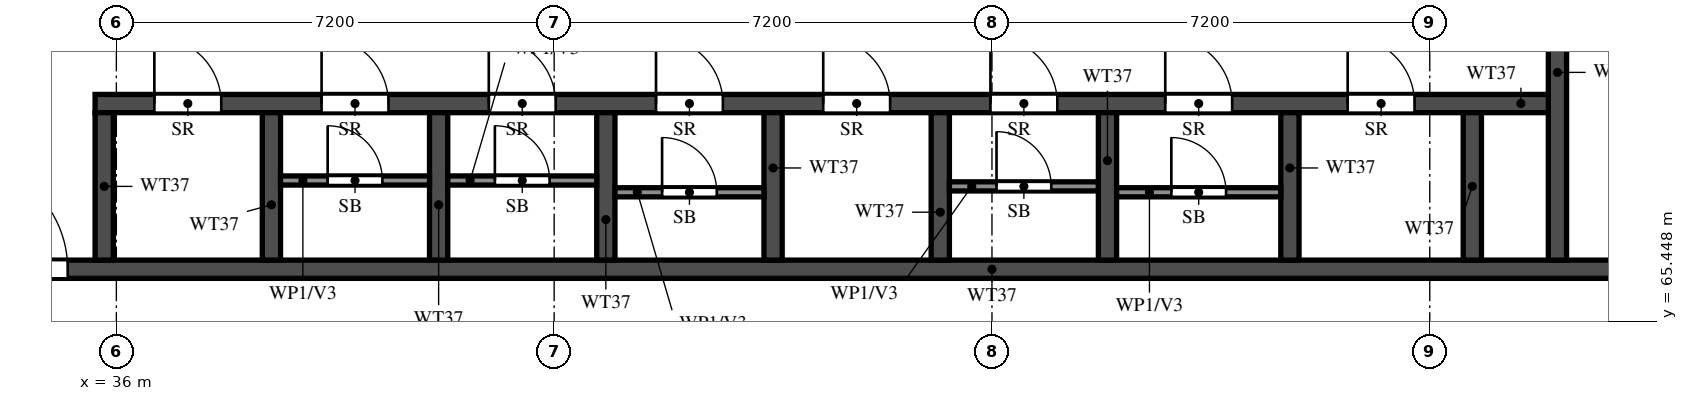
"""IFC4 building model, lengths in metres.
Left out: names, types, materials, properties, quantities, classifications, styles, units other than length and angle.
Written with IfcOpenShell. Run it as: python <this file> out.ifc"""

import sys

from ifc_helpers import new_model, si_unit, direction, frame, frame_2d, origin, place, context, subcontext, project, spatial, rectangle, extrude, element, fill, save


model = new_model("IFC4")
c1 = context("Model", 3, precision=1e-05, world=origin(), true_north=direction((0.0, 1.0)))
c2 = subcontext(c1, "Body", "Model", "MODEL_VIEW")
j1 = project(units=[si_unit("LENGTHUNIT", "METRE"), si_unit("PLANEANGLEUNIT", "RADIAN")], contexts=[c1])
p1 = place(None, origin())
s1 = spatial("IfcSite", under=j1, at=p1, CompositionType="ELEMENT")
p2 = place(p1, origin())
s2 = spatial("IfcBuilding", under=s1, at=p2, CompositionType="ELEMENT")
p3 = place(p2, frame((0.0, 0.0, 257.0)))
s3 = spatial("IfcBuildingStorey", under=s2, at=p3, CompositionType="ELEMENT", Elevation=257.0)
p4 = place(p3, frame((29.2, 66.3, 0.0), z_axis=(0.0, 0.0, 1.0), x_axis=(1.0, 0.0, 0.0)))
e1 = element("IfcWall", 1, at=p4, inside=s3, PredefinedType="SHEAR", context=c2, shape_type="SweptSolid", body=[
    extrude(rectangle(XDim=42.4, YDim=0.3, at=frame_2d((21.2, 0.0))), origin(), (0.0, 0.0, 1.0), 3.22),
])
p5 = place(p4, frame((1.425, 0.0, 0.0)))
e2 = element("IfcOpeningElement", 2, at=p5, cuts=e1, PredefinedType="OPENING", context=c2, shape_type="SweptSolid", body=[
    extrude(rectangle(XDim=1.1, YDim=2.1, at=frame_2d((0.55, 1.05))), frame((0.0, 0.16, 0.0), z_axis=(0.0, -1.0, 0.0), x_axis=(1.0, 0.0, 0.0)), (0.0, 0.0, 1.0), 0.32),
])
p6 = place(p4, frame((4.2, 0.0, 0.0)))
e3 = element("IfcOpeningElement", 3, at=p6, cuts=e1, PredefinedType="OPENING", context=c2, shape_type="SweptSolid", body=[
    extrude(rectangle(XDim=1.8, YDim=2.1, at=frame_2d((0.9, 1.05))), frame((0.0, 0.16, 0.0), z_axis=(0.0, -1.0, 0.0), x_axis=(1.0, 0.0, 0.0)), (0.0, 0.0, 1.0), 0.32),
])
p7 = place(p3, frame((35.65, 69.025, 0.0), z_axis=(0.0, 0.0, 1.0), x_axis=(1.0, 0.0, 0.0)))
e4 = element("IfcWall", 4, at=p7, inside=s3, PredefinedType="SHEAR", context=c2, shape_type="SweptSolid", body=[
    extrude(rectangle(XDim=24.05, YDim=0.3, at=frame_2d((12.025, 0.0))), origin(), (0.0, 0.0, 1.0), 3.22),
])
p8 = place(p7, frame((0.975, 0.0, 0.0)))
e5 = element("IfcOpeningElement", 5, at=p8, cuts=e4, PredefinedType="OPENING", context=c2, shape_type="SweptSolid", body=[
    extrude(rectangle(XDim=1.1, YDim=2.1, at=frame_2d((0.55, 1.05))), frame((0.0, 0.16, 0.0), z_axis=(0.0, -1.0, 0.0), x_axis=(1.0, 0.0, 0.0)), (0.0, 0.0, 1.0), 0.32),
])
p9 = place(p7, frame((3.725, 0.0, 0.0)))
e6 = element("IfcOpeningElement", 6, at=p9, cuts=e4, PredefinedType="OPENING", context=c2, shape_type="SweptSolid", body=[
    extrude(rectangle(XDim=1.1, YDim=2.1, at=frame_2d((0.55, 1.05))), frame((0.0, 0.16, 0.0), z_axis=(0.0, -1.0, 0.0), x_axis=(1.0, 0.0, 0.0)), (0.0, 0.0, 1.0), 0.32),
])
p10 = place(p7, frame((6.475, 0.0, 0.0)))
e7 = element("IfcOpeningElement", 7, at=p10, cuts=e4, PredefinedType="OPENING", context=c2, shape_type="SweptSolid", body=[
    extrude(rectangle(XDim=1.1, YDim=2.1, at=frame_2d((0.55, 1.05))), frame((0.0, 0.16, 0.0), z_axis=(0.0, -1.0, 0.0), x_axis=(1.0, 0.0, 0.0)), (0.0, 0.0, 1.0), 0.32),
])
p11 = place(p7, frame((9.225, 0.0, 0.0)))
e8 = element("IfcOpeningElement", 8, at=p11, cuts=e4, PredefinedType="OPENING", context=c2, shape_type="SweptSolid", body=[
    extrude(rectangle(XDim=1.1, YDim=2.1, at=frame_2d((0.55, 1.05))), frame((0.0, 0.16, 0.0), z_axis=(0.0, -1.0, 0.0), x_axis=(1.0, 0.0, 0.0)), (0.0, 0.0, 1.0), 0.32),
])
p12 = place(p7, frame((11.975, 0.0, 0.0)))
e9 = element("IfcOpeningElement", 9, at=p12, cuts=e4, PredefinedType="OPENING", context=c2, shape_type="SweptSolid", body=[
    extrude(rectangle(XDim=1.1, YDim=2.1, at=frame_2d((0.55, 1.05))), frame((0.0, 0.16, 0.0), z_axis=(0.0, -1.0, 0.0), x_axis=(1.0, 0.0, 0.0)), (0.0, 0.0, 1.0), 0.32),
])
p13 = place(p7, frame((14.725, 0.0, 0.0)))
e10 = element("IfcOpeningElement", 10, at=p13, cuts=e4, PredefinedType="OPENING", context=c2, shape_type="SweptSolid", body=[
    extrude(rectangle(XDim=1.1, YDim=2.1, at=frame_2d((0.55, 1.05))), frame((0.0, 0.16, 0.0), z_axis=(0.0, -1.0, 0.0), x_axis=(1.0, 0.0, 0.0)), (0.0, 0.0, 1.0), 0.32),
])
p14 = place(p7, frame((17.6, 0.0, 0.0)))
e11 = element("IfcOpeningElement", 11, at=p14, cuts=e4, PredefinedType="OPENING", context=c2, shape_type="SweptSolid", body=[
    extrude(rectangle(XDim=1.1, YDim=2.1, at=frame_2d((0.55, 1.05))), frame((0.0, 0.16, 0.0), z_axis=(0.0, -1.0, 0.0), x_axis=(1.0, 0.0, 0.0)), (0.0, 0.0, 1.0), 0.32),
])
p15 = place(p7, frame((20.6, 0.0, 0.0)))
e12 = element("IfcOpeningElement", 12, at=p15, cuts=e4, PredefinedType="OPENING", context=c2, shape_type="SweptSolid", body=[
    extrude(rectangle(XDim=1.1, YDim=2.1, at=frame_2d((0.55, 1.05))), frame((0.0, 0.16, 0.0), z_axis=(0.0, -1.0, 0.0), x_axis=(1.0, 0.0, 0.0)), (0.0, 0.0, 1.0), 0.32),
])
p16 = place(p3, frame((59.7, 66.45, 0.0), z_axis=(0.0, 0.0, 1.0), x_axis=(0.0, 1.0, 0.0)))
e13 = element("IfcWall", 13, at=p16, inside=s3, PredefinedType="SHEAR", context=c2, shape_type="SweptSolid", body=[
    extrude(rectangle(XDim=6.175, YDim=0.3, at=frame_2d((3.087, 0.0))), origin(), (0.0, 0.0, 1.0), 3.22),
])
p17 = place(p16, frame((3.85, 0.0, 0.0)))
e14 = element("IfcOpeningElement", 14, at=p17, cuts=e13, PredefinedType="OPENING", context=c2, shape_type="SweptSolid", body=[
    extrude(rectangle(XDim=1.2, YDim=2.1, at=frame_2d((0.6, 1.05))), frame((0.0, 0.16, 0.0), z_axis=(0.0, -1.0, 0.0), x_axis=(1.0, 0.0, 0.0)), (0.0, 0.0, 1.0), 0.32),
])
for number, where, z_axis, x_axis in (
    (15, (35.8, 66.45, 0.0), (0.0, 0.0, 1.0), (0.0, 1.0, 0.0)),
    (16, (38.55, 66.45, 0.0), (0.0, 0.0, 1.0), (0.0, 1.0, 0.0)),
    (17, (41.3, 66.45, 0.0), (0.0, 0.0, 1.0), (0.0, 1.0, 0.0)),
    (18, (44.05, 66.45, 0.0), (0.0, 0.0, 1.0), (0.0, 1.0, 0.0)),
    (19, (46.8, 66.45, 0.0), (0.0, 0.0, 1.0), (0.0, 1.0, 0.0)),
    (20, (49.55, 66.45, 0.0), (0.0, 0.0, 1.0), (0.0, 1.0, 0.0)),
    (21, (52.3, 66.45, 0.0), (0.0, 0.0, 1.0), (0.0, 1.0, 0.0)),
    (22, (55.3, 66.45, 0.0), (0.0, 0.0, 1.0), (0.0, 1.0, 0.0)),
    (23, (58.3, 66.45, 0.0), (0.0, 0.0, 1.0), (0.0, 1.0, 0.0)),
):
    element("IfcWall", number, at=place(p3, frame(where, z_axis=z_axis, x_axis=x_axis)), inside=s3, PredefinedType="SHEAR", context=c2, shape_type="SweptSolid", body=[
        extrude(rectangle(XDim=2.425, YDim=0.3, at=frame_2d((1.212, 0.0))), origin(), (0.0, 0.0, 1.0), 3.22),
    ])
p18 = place(p3, frame((38.7, 67.76, 0.0), z_axis=(0.0, 0.0, 1.0), x_axis=(1.0, 0.0, 0.0)))
e24 = element("IfcWall", 24, at=p18, inside=s3, PredefinedType="PARTITIONING", context=c2, shape_type="SweptSolid", body=[
    extrude(rectangle(XDim=2.45, YDim=0.15, at=frame_2d((1.225, 0.0))), origin(), (0.0, 0.0, 1.0), 3.22),
])
p19 = place(p18, frame((0.775, 0.0, 0.0)))
e25 = element("IfcOpeningElement", 25, at=p19, cuts=e24, PredefinedType="OPENING", context=c2, shape_type="SweptSolid", body=[
    extrude(rectangle(XDim=0.9, YDim=2.1, at=frame_2d((0.45, 1.05))), frame((0.0, 0.085, 0.0), z_axis=(0.0, -1.0, 0.0), x_axis=(1.0, 0.0, 0.0)), (0.0, 0.0, 1.0), 0.17),
])
p20 = place(p3, frame((41.45, 67.76, 0.0), z_axis=(0.0, 0.0, 1.0), x_axis=(1.0, 0.0, 0.0)))
e26 = element("IfcWall", 26, at=p20, inside=s3, PredefinedType="PARTITIONING", context=c2, shape_type="SweptSolid", body=[
    extrude(rectangle(XDim=2.45, YDim=0.15, at=frame_2d((1.225, 0.0))), origin(), (0.0, 0.0, 1.0), 3.22),
])
p21 = place(p20, frame((0.775, 0.0, 0.0)))
e27 = element("IfcOpeningElement", 27, at=p21, cuts=e26, PredefinedType="OPENING", context=c2, shape_type="SweptSolid", body=[
    extrude(rectangle(XDim=0.9, YDim=2.1, at=frame_2d((0.45, 1.05))), frame((0.0, 0.085, 0.0), z_axis=(0.0, -1.0, 0.0), x_axis=(1.0, 0.0, 0.0)), (0.0, 0.0, 1.0), 0.17),
])
p22 = place(p3, frame((44.2, 67.565, 0.0), z_axis=(0.0, 0.0, 1.0), x_axis=(1.0, 0.0, 0.0)))
e28 = element("IfcWall", 28, at=p22, inside=s3, PredefinedType="PARTITIONING", context=c2, shape_type="SweptSolid", body=[
    extrude(rectangle(XDim=2.45, YDim=0.15, at=frame_2d((1.225, 0.0))), origin(), (0.0, 0.0, 1.0), 3.22),
])
p23 = place(p22, frame((0.775, 0.0, 0.0)))
e29 = element("IfcOpeningElement", 29, at=p23, cuts=e28, PredefinedType="OPENING", context=c2, shape_type="SweptSolid", body=[
    extrude(rectangle(XDim=0.9, YDim=2.1, at=frame_2d((0.45, 1.05))), frame((0.0, 0.085, 0.0), z_axis=(0.0, -1.0, 0.0), x_axis=(1.0, 0.0, 0.0)), (0.0, 0.0, 1.0), 0.17),
])
p24 = place(p3, frame((49.7, 67.663, 0.0), z_axis=(0.0, 0.0, 1.0), x_axis=(1.0, 0.0, 0.0)))
e30 = element("IfcWall", 30, at=p24, inside=s3, PredefinedType="PARTITIONING", context=c2, shape_type="SweptSolid", body=[
    extrude(rectangle(XDim=2.45, YDim=0.15, at=frame_2d((1.225, 0.0))), origin(), (0.0, 0.0, 1.0), 3.22),
])
p25 = place(p24, frame((0.775, 0.0, 0.0)))
e31 = element("IfcOpeningElement", 31, at=p25, cuts=e30, PredefinedType="OPENING", context=c2, shape_type="SweptSolid", body=[
    extrude(rectangle(XDim=0.9, YDim=2.1, at=frame_2d((0.45, 1.05))), frame((0.0, 0.085, 0.0), z_axis=(0.0, -1.0, 0.0), x_axis=(1.0, 0.0, 0.0)), (0.0, 0.0, 1.0), 0.17),
])
p26 = place(p3, frame((52.45, 67.565, 0.0), z_axis=(0.0, 0.0, 1.0), x_axis=(1.0, 0.0, 0.0)))
e32 = element("IfcWall", 32, at=p26, inside=s3, PredefinedType="PARTITIONING", context=c2, shape_type="SweptSolid", body=[
    extrude(rectangle(XDim=2.7, YDim=0.15, at=frame_2d((1.35, 0.0))), origin(), (0.0, 0.0, 1.0), 3.22),
])
p27 = place(p26, frame((0.9, 0.0, 0.0)))
e33 = element("IfcOpeningElement", 33, at=p27, cuts=e32, PredefinedType="OPENING", context=c2, shape_type="SweptSolid", body=[
    extrude(rectangle(XDim=0.9, YDim=2.1, at=frame_2d((0.45, 1.05))), frame((0.0, 0.085, 0.0), z_axis=(0.0, -1.0, 0.0), x_axis=(1.0, 0.0, 0.0)), (0.0, 0.0, 1.0), 0.17),
])
p28 = place(p6, origin())
e34 = element("IfcDoor", 34, at=p28, inside=s3, OperationType="DOUBLE_DOOR_SINGLE_SWING", PredefinedType="DOOR", context=c2, shape_type="SweptSolid", body=[
    extrude(rectangle(XDim=1.8, YDim=2.1, at=frame_2d((0.9, 1.05))), frame((0.0, 0.025, 0.0), z_axis=(0.0, -1.0, 0.0), x_axis=(1.0, 0.0, 0.0)), (0.0, 0.0, 1.0), 0.05),
])
fill(e3, e34)
p29 = place(p8, origin())
e35 = element("IfcDoor", 35, at=p29, inside=s3, OperationType="SINGLE_SWING_RIGHT", PredefinedType="DOOR", context=c2, shape_type="SweptSolid", body=[
    extrude(rectangle(XDim=1.1, YDim=2.1, at=frame_2d((0.55, 1.05))), frame((0.0, 0.025, 0.0), z_axis=(0.0, -1.0, 0.0), x_axis=(1.0, 0.0, 0.0)), (0.0, 0.0, 1.0), 0.05),
])
fill(e5, e35)
p30 = place(p9, origin())
e36 = element("IfcDoor", 36, at=p30, inside=s3, OperationType="SINGLE_SWING_LEFT", PredefinedType="DOOR", context=c2, shape_type="SweptSolid", body=[
    extrude(rectangle(XDim=1.1, YDim=2.1, at=frame_2d((0.55, 1.05))), frame((0.0, 0.025, 0.0), z_axis=(0.0, -1.0, 0.0), x_axis=(1.0, 0.0, 0.0)), (0.0, 0.0, 1.0), 0.05),
])
fill(e6, e36)
p31 = place(p19, origin())
e37 = element("IfcDoor", 37, at=p31, inside=s3, OperationType="SINGLE_SWING_RIGHT", PredefinedType="DOOR", context=c2, shape_type="SweptSolid", body=[
    extrude(rectangle(XDim=0.9, YDim=2.1, at=frame_2d((0.45, 1.05))), frame((0.0, 0.025, 0.0), z_axis=(0.0, -1.0, 0.0), x_axis=(1.0, 0.0, 0.0)), (0.0, 0.0, 1.0), 0.05),
])
fill(e25, e37)
p32 = place(p10, origin())
e38 = element("IfcDoor", 38, at=p32, inside=s3, OperationType="SINGLE_SWING_RIGHT", PredefinedType="DOOR", context=c2, shape_type="SweptSolid", body=[
    extrude(rectangle(XDim=1.1, YDim=2.1, at=frame_2d((0.55, 1.05))), frame((0.0, 0.025, 0.0), z_axis=(0.0, -1.0, 0.0), x_axis=(1.0, 0.0, 0.0)), (0.0, 0.0, 1.0), 0.05),
])
fill(e7, e38)
p33 = place(p21, origin())
e39 = element("IfcDoor", 39, at=p33, inside=s3, OperationType="SINGLE_SWING_LEFT", PredefinedType="DOOR", context=c2, shape_type="SweptSolid", body=[
    extrude(rectangle(XDim=0.9, YDim=2.1, at=frame_2d((0.45, 1.05))), frame((0.0, 0.025, 0.0), z_axis=(0.0, -1.0, 0.0), x_axis=(1.0, 0.0, 0.0)), (0.0, 0.0, 1.0), 0.05),
])
fill(e27, e39)
p34 = place(p11, origin())
e40 = element("IfcDoor", 40, at=p34, inside=s3, OperationType="SINGLE_SWING_LEFT", PredefinedType="DOOR", context=c2, shape_type="SweptSolid", body=[
    extrude(rectangle(XDim=1.1, YDim=2.1, at=frame_2d((0.55, 1.05))), frame((0.0, 0.025, 0.0), z_axis=(0.0, -1.0, 0.0), x_axis=(1.0, 0.0, 0.0)), (0.0, 0.0, 1.0), 0.05),
])
fill(e8, e40)
p35 = place(p23, origin())
e41 = element("IfcDoor", 41, at=p35, inside=s3, OperationType="SINGLE_SWING_LEFT", PredefinedType="DOOR", context=c2, shape_type="SweptSolid", body=[
    extrude(rectangle(XDim=0.9, YDim=2.1, at=frame_2d((0.45, 1.05))), frame((0.0, 0.025, 0.0), z_axis=(0.0, -1.0, 0.0), x_axis=(1.0, 0.0, 0.0)), (0.0, 0.0, 1.0), 0.05),
])
fill(e29, e41)
p36 = place(p12, origin())
e42 = element("IfcDoor", 42, at=p36, inside=s3, OperationType="SINGLE_SWING_RIGHT", PredefinedType="DOOR", context=c2, shape_type="SweptSolid", body=[
    extrude(rectangle(XDim=1.1, YDim=2.1, at=frame_2d((0.55, 1.05))), frame((0.0, 0.025, 0.0), z_axis=(0.0, -1.0, 0.0), x_axis=(1.0, 0.0, 0.0)), (0.0, 0.0, 1.0), 0.05),
])
fill(e9, e42)
p37 = place(p13, origin())
e43 = element("IfcDoor", 43, at=p37, inside=s3, OperationType="SINGLE_SWING_LEFT", PredefinedType="DOOR", context=c2, shape_type="SweptSolid", body=[
    extrude(rectangle(XDim=1.1, YDim=2.1, at=frame_2d((0.55, 1.05))), frame((0.0, 0.025, 0.0), z_axis=(0.0, -1.0, 0.0), x_axis=(1.0, 0.0, 0.0)), (0.0, 0.0, 1.0), 0.05),
])
fill(e10, e43)
p38 = place(p25, origin())
e44 = element("IfcDoor", 44, at=p38, inside=s3, OperationType="SINGLE_SWING_LEFT", PredefinedType="DOOR", context=c2, shape_type="SweptSolid", body=[
    extrude(rectangle(XDim=0.9, YDim=2.1, at=frame_2d((0.45, 1.05))), frame((0.0, 0.025, 0.0), z_axis=(0.0, -1.0, 0.0), x_axis=(1.0, 0.0, 0.0)), (0.0, 0.0, 1.0), 0.05),
])
fill(e31, e44)
p39 = place(p14, origin())
e45 = element("IfcDoor", 45, at=p39, inside=s3, OperationType="SINGLE_SWING_RIGHT", PredefinedType="DOOR", context=c2, shape_type="SweptSolid", body=[
    extrude(rectangle(XDim=1.1, YDim=2.1, at=frame_2d((0.55, 1.05))), frame((0.0, 0.025, 0.0), z_axis=(0.0, -1.0, 0.0), x_axis=(1.0, 0.0, 0.0)), (0.0, 0.0, 1.0), 0.05),
])
fill(e11, e45)
p40 = place(p27, origin())
e46 = element("IfcDoor", 46, at=p40, inside=s3, OperationType="SINGLE_SWING_RIGHT", PredefinedType="DOOR", context=c2, shape_type="SweptSolid", body=[
    extrude(rectangle(XDim=0.9, YDim=2.1, at=frame_2d((0.45, 1.05))), frame((0.0, 0.025, 0.0), z_axis=(0.0, -1.0, 0.0), x_axis=(1.0, 0.0, 0.0)), (0.0, 0.0, 1.0), 0.05),
])
fill(e33, e46)
p41 = place(p15, origin())
e47 = element("IfcDoor", 47, at=p41, inside=s3, OperationType="SINGLE_SWING_RIGHT", PredefinedType="DOOR", context=c2, shape_type="SweptSolid", body=[
    extrude(rectangle(XDim=1.1, YDim=2.1, at=frame_2d((0.55, 1.05))), frame((0.0, 0.025, 0.0), z_axis=(0.0, -1.0, 0.0), x_axis=(1.0, 0.0, 0.0)), (0.0, 0.0, 1.0), 0.05),
])
fill(e12, e47)
save(model, sys.argv[1])
